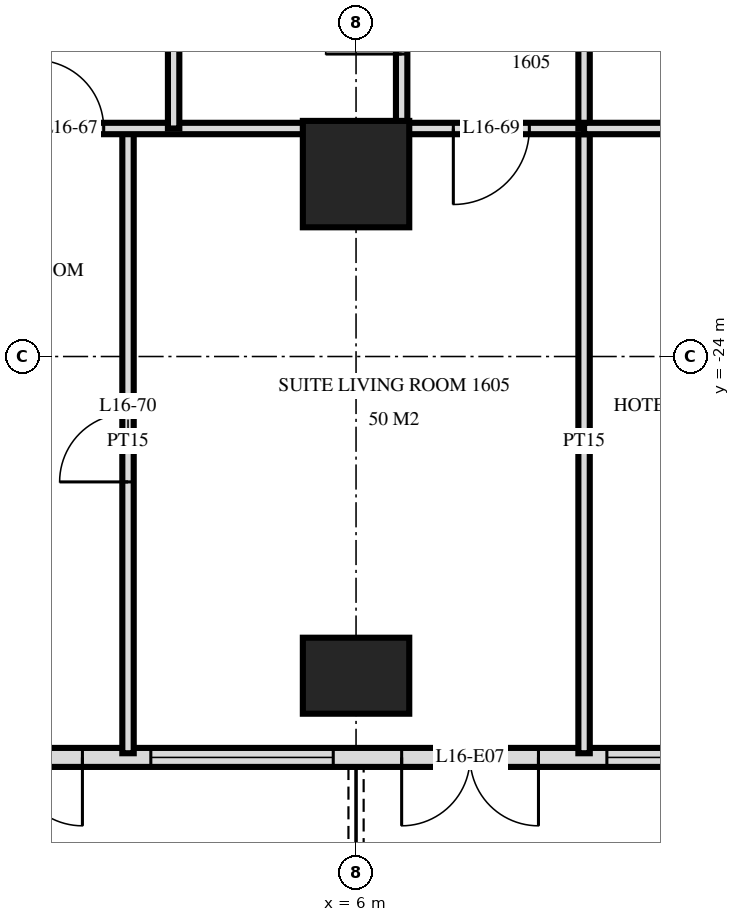
"""IFC4 building model, lengths in metres.
Left out: names, types, materials, properties, quantities, classifications, styles, units other than length and angle.
Written with IfcOpenShell. Run it as: python <this file> out.ifc"""

import sys

from ifc_helpers import new_model, si_unit, direction, frame, frame_2d, origin, origin_2d, place, context, subcontext, project, spatial, rectangle, extrude, element, fill, save


model = new_model("IFC4")
c1 = context("Model", 3, precision=1e-05, world=origin(), true_north=direction((0.0, 1.0)))
c2 = subcontext(c1, "Body", "Model", "MODEL_VIEW")
j1 = project(units=[si_unit("LENGTHUNIT", "METRE"), si_unit("PLANEANGLEUNIT", "RADIAN")], contexts=[c1])
p1 = place(None, origin())
s1 = spatial("IfcSite", under=j1, at=p1, CompositionType="ELEMENT")
p2 = place(p1, origin())
s2 = spatial("IfcBuilding", under=s1, at=p2, CompositionType="ELEMENT")
p3 = place(p2, frame((0.0, 0.0, 67.2)))
s3 = spatial("IfcBuildingStorey", under=s2, at=p3, CompositionType="ELEMENT", Elevation=67.2)
p4 = place(p3, frame((6.0, -28.2, 0.0), z_axis=(0.0, 0.0, 1.0), x_axis=(1.0, 0.0, 0.0)))
e1 = element("IfcColumn", 1, at=p4, inside=s3, PredefinedType="COLUMN", context=c2, shape_type="SweptSolid", body=[
    extrude(rectangle(XDim=1.4, YDim=1.0, at=origin_2d()), origin(), (0.0, 0.0, 1.0), 3.6),
])
p5 = place(p3, frame((6.0, -21.6, 0.0), z_axis=(0.0, 0.0, 1.0), x_axis=(1.0, 0.0, 0.0)))
e2 = element("IfcColumn", 2, at=p5, inside=s3, PredefinedType="COLUMN", context=c2, shape_type="SweptSolid", body=[
    extrude(rectangle(XDim=1.4, YDim=1.4, at=origin_2d()), origin(), (0.0, 0.0, 1.0), 3.6),
])
p6 = place(p3, frame((-28.775, -29.275, 0.0), z_axis=(0.0, 0.0, 1.0), x_axis=(1.0, 0.0, 0.0)))
e3 = element("IfcWall", 3, at=p6, inside=s3, PredefinedType="SOLIDWALL", context=c2, shape_type="SweptSolid", body=[
    extrude(rectangle(XDim=57.551, YDim=0.25, at=frame_2d((28.775, 0.0))), origin(), (0.0, 0.0, 1.0), 3.32),
])
p7 = place(p6, frame((0.575, 0.0, 0.0)))
e4 = element("IfcOpeningElement", 4, at=p7, cuts=e3, PredefinedType="OPENING", context=c2, shape_type="SweptSolid", body=[
    extrude(rectangle(XDim=1.8, YDim=2.4, at=frame_2d((0.9, 1.2))), frame((0.0, 0.135, 0.0), z_axis=(0.0, -1.0, 0.0), x_axis=(1.0, 0.0, 0.0)), (0.0, 0.0, 1.0), 0.27),
])
p8 = place(p6, frame((5.075, 0.0, 0.3)))
e5 = element("IfcOpeningElement", 5, at=p8, cuts=e3, PredefinedType="OPENING", context=c2, shape_type="SweptSolid", body=[
    extrude(rectangle(XDim=2.4, YDim=2.1, at=frame_2d((1.2, 1.05))), frame((0.0, 0.135, 0.0), z_axis=(0.0, -1.0, 0.0), x_axis=(1.0, 0.0, 0.0)), (0.0, 0.0, 1.0), 0.27),
])
p9 = place(p6, frame((8.375, 0.0, 0.0)))
e6 = element("IfcOpeningElement", 6, at=p9, cuts=e3, PredefinedType="OPENING", context=c2, shape_type="SweptSolid", body=[
    extrude(rectangle(XDim=1.8, YDim=2.4, at=frame_2d((0.9, 1.2))), frame((0.0, 0.135, 0.0), z_axis=(0.0, -1.0, 0.0), x_axis=(1.0, 0.0, 0.0)), (0.0, 0.0, 1.0), 0.27),
])
p10 = place(p6, frame((11.375, 0.0, 0.0)))
e7 = element("IfcOpeningElement", 7, at=p10, cuts=e3, PredefinedType="OPENING", context=c2, shape_type="SweptSolid", body=[
    extrude(rectangle(XDim=1.8, YDim=2.4, at=frame_2d((0.9, 1.2))), frame((0.0, 0.135, 0.0), z_axis=(0.0, -1.0, 0.0), x_axis=(1.0, 0.0, 0.0)), (0.0, 0.0, 1.0), 0.27),
])
p11 = place(p6, frame((14.075, 0.0, 0.3)))
e8 = element("IfcOpeningElement", 8, at=p11, cuts=e3, PredefinedType="OPENING", context=c2, shape_type="SweptSolid", body=[
    extrude(rectangle(XDim=2.4, YDim=2.1, at=frame_2d((1.2, 1.05))), frame((0.0, 0.135, 0.0), z_axis=(0.0, -1.0, 0.0), x_axis=(1.0, 0.0, 0.0)), (0.0, 0.0, 1.0), 0.27),
])
p12 = place(p6, frame((17.375, 0.0, 0.0)))
e9 = element("IfcOpeningElement", 9, at=p12, cuts=e3, PredefinedType="OPENING", context=c2, shape_type="SweptSolid", body=[
    extrude(rectangle(XDim=1.8, YDim=2.4, at=frame_2d((0.9, 1.2))), frame((0.0, 0.135, 0.0), z_axis=(0.0, -1.0, 0.0), x_axis=(1.0, 0.0, 0.0)), (0.0, 0.0, 1.0), 0.27),
])
p13 = place(p6, frame((20.075, 0.0, 0.3)))
e10 = element("IfcOpeningElement", 10, at=p13, cuts=e3, PredefinedType="OPENING", context=c2, shape_type="SweptSolid", body=[
    extrude(rectangle(XDim=2.4, YDim=2.1, at=frame_2d((1.2, 1.05))), frame((0.0, 0.135, 0.0), z_axis=(0.0, -1.0, 0.0), x_axis=(1.0, 0.0, 0.0)), (0.0, 0.0, 1.0), 0.27),
])
p14 = place(p6, frame((23.075, 0.0, 0.3)))
e11 = element("IfcOpeningElement", 11, at=p14, cuts=e3, PredefinedType="OPENING", context=c2, shape_type="SweptSolid", body=[
    extrude(rectangle(XDim=2.4, YDim=2.1, at=frame_2d((1.2, 1.05))), frame((0.0, 0.135, 0.0), z_axis=(0.0, -1.0, 0.0), x_axis=(1.0, 0.0, 0.0)), (0.0, 0.0, 1.0), 0.27),
])
p15 = place(p6, frame((26.375, 0.0, 0.0)))
e12 = element("IfcOpeningElement", 12, at=p15, cuts=e3, PredefinedType="OPENING", context=c2, shape_type="SweptSolid", body=[
    extrude(rectangle(XDim=1.8, YDim=2.4, at=frame_2d((0.9, 1.2))), frame((0.0, 0.135, 0.0), z_axis=(0.0, -1.0, 0.0), x_axis=(1.0, 0.0, 0.0)), (0.0, 0.0, 1.0), 0.27),
])
p16 = place(p6, frame((29.375, 0.0, 0.0)))
e13 = element("IfcOpeningElement", 13, at=p16, cuts=e3, PredefinedType="OPENING", context=c2, shape_type="SweptSolid", body=[
    extrude(rectangle(XDim=1.8, YDim=2.4, at=frame_2d((0.9, 1.2))), frame((0.0, 0.135, 0.0), z_axis=(0.0, -1.0, 0.0), x_axis=(1.0, 0.0, 0.0)), (0.0, 0.0, 1.0), 0.27),
])
p17 = place(p6, frame((32.075, 0.0, 0.3)))
e14 = element("IfcOpeningElement", 14, at=p17, cuts=e3, PredefinedType="OPENING", context=c2, shape_type="SweptSolid", body=[
    extrude(rectangle(XDim=2.4, YDim=2.1, at=frame_2d((1.2, 1.05))), frame((0.0, 0.135, 0.0), z_axis=(0.0, -1.0, 0.0), x_axis=(1.0, 0.0, 0.0)), (0.0, 0.0, 1.0), 0.27),
])
p18 = place(p6, frame((35.375, 0.0, 0.0)))
e15 = element("IfcOpeningElement", 15, at=p18, cuts=e3, PredefinedType="OPENING", context=c2, shape_type="SweptSolid", body=[
    extrude(rectangle(XDim=1.8, YDim=2.4, at=frame_2d((0.9, 1.2))), frame((0.0, 0.135, 0.0), z_axis=(0.0, -1.0, 0.0), x_axis=(1.0, 0.0, 0.0)), (0.0, 0.0, 1.0), 0.27),
])
p19 = place(p6, frame((38.075, 0.0, 0.3)))
e16 = element("IfcOpeningElement", 16, at=p19, cuts=e3, PredefinedType="OPENING", context=c2, shape_type="SweptSolid", body=[
    extrude(rectangle(XDim=2.4, YDim=2.1, at=frame_2d((1.2, 1.05))), frame((0.0, 0.135, 0.0), z_axis=(0.0, -1.0, 0.0), x_axis=(1.0, 0.0, 0.0)), (0.0, 0.0, 1.0), 0.27),
])
p20 = place(p6, frame((41.075, 0.0, 0.3)))
e17 = element("IfcOpeningElement", 17, at=p20, cuts=e3, PredefinedType="OPENING", context=c2, shape_type="SweptSolid", body=[
    extrude(rectangle(XDim=2.4, YDim=2.1, at=frame_2d((1.2, 1.05))), frame((0.0, 0.135, 0.0), z_axis=(0.0, -1.0, 0.0), x_axis=(1.0, 0.0, 0.0)), (0.0, 0.0, 1.0), 0.27),
])
p21 = place(p6, frame((44.375, 0.0, 0.0)))
e18 = element("IfcOpeningElement", 18, at=p21, cuts=e3, PredefinedType="OPENING", context=c2, shape_type="SweptSolid", body=[
    extrude(rectangle(XDim=1.8, YDim=2.4, at=frame_2d((0.9, 1.2))), frame((0.0, 0.135, 0.0), z_axis=(0.0, -1.0, 0.0), x_axis=(1.0, 0.0, 0.0)), (0.0, 0.0, 1.0), 0.27),
])
p22 = place(p6, frame((47.075, 0.0, 0.3)))
e19 = element("IfcOpeningElement", 19, at=p22, cuts=e3, PredefinedType="OPENING", context=c2, shape_type="SweptSolid", body=[
    extrude(rectangle(XDim=2.4, YDim=2.1, at=frame_2d((1.2, 1.05))), frame((0.0, 0.135, 0.0), z_axis=(0.0, -1.0, 0.0), x_axis=(1.0, 0.0, 0.0)), (0.0, 0.0, 1.0), 0.27),
])
p23 = place(p6, frame((50.375, 0.0, 0.0)))
e20 = element("IfcOpeningElement", 20, at=p23, cuts=e3, PredefinedType="OPENING", context=c2, shape_type="SweptSolid", body=[
    extrude(rectangle(XDim=1.8, YDim=2.4, at=frame_2d((0.9, 1.2))), frame((0.0, 0.135, 0.0), z_axis=(0.0, -1.0, 0.0), x_axis=(1.0, 0.0, 0.0)), (0.0, 0.0, 1.0), 0.27),
])
p24 = place(p6, frame((53.375, 0.0, 0.0)))
e21 = element("IfcOpeningElement", 21, at=p24, cuts=e3, PredefinedType="OPENING", context=c2, shape_type="SweptSolid", body=[
    extrude(rectangle(XDim=1.8, YDim=2.4, at=frame_2d((0.9, 1.2))), frame((0.0, 0.135, 0.0), z_axis=(0.0, -1.0, 0.0), x_axis=(1.0, 0.0, 0.0)), (0.0, 0.0, 1.0), 0.27),
])
p25 = place(p3, frame((9.0, -21.0, 0.0), z_axis=(0.0, 0.0, 1.0), x_axis=(0.0, 1.0, 0.0)))
e22 = element("IfcWall", 22, at=p25, inside=s3, PredefinedType="PARTITIONING", context=c2, shape_type="SweptSolid", body=[
    extrude(rectangle(XDim=3.0, YDim=0.15, at=frame_2d((1.5, 0.0))), origin(), (0.0, 0.0, 1.0), 3.32),
])
p26 = place(p3, frame((9.0, -29.22, 0.0), z_axis=(0.0, 0.0, 1.0), x_axis=(0.0, 1.0, 0.0)))
e23 = element("IfcWall", 23, at=p26, inside=s3, PredefinedType="PARTITIONING", context=c2, shape_type="SweptSolid", body=[
    extrude(rectangle(XDim=8.22, YDim=0.15, at=frame_2d((4.11, 0.0))), origin(), (0.0, 0.0, 1.0), 3.32),
])
p27 = place(p3, frame((6.6, -21.0, 0.0), z_axis=(0.0, 0.0, 1.0), x_axis=(0.0, 1.0, 0.0)))
e24 = element("IfcWall", 24, at=p27, inside=s3, PredefinedType="PARTITIONING", context=c2, shape_type="SweptSolid", body=[
    extrude(rectangle(XDim=3.0, YDim=0.15, at=frame_2d((1.5, 0.0))), origin(), (0.0, 0.0, 1.0), 3.32),
])
p28 = place(p27, frame((0.98, 0.0, 0.0)))
e25 = element("IfcOpeningElement", 25, at=p28, cuts=e24, PredefinedType="OPENING", context=c2, shape_type="SweptSolid", body=[
    extrude(rectangle(XDim=1.0, YDim=2.1, at=frame_2d((0.5, 1.05))), frame((0.0, 0.085, 0.0), z_axis=(0.0, -1.0, 0.0), x_axis=(1.0, 0.0, 0.0)), (0.0, 0.0, 1.0), 0.17),
])
p29 = place(p3, frame((3.6, -21.0, 0.0), z_axis=(0.0, 0.0, 1.0), x_axis=(0.0, 1.0, 0.0)))
e26 = element("IfcWall", 26, at=p29, inside=s3, PredefinedType="PARTITIONING", context=c2, shape_type="SweptSolid", body=[
    extrude(rectangle(XDim=3.0, YDim=0.15, at=frame_2d((1.5, 0.0))), origin(), (0.0, 0.0, 1.0), 3.32),
])
p30 = place(p3, frame((3.0, -29.22, 0.0), z_axis=(0.0, 0.0, 1.0), x_axis=(0.0, 1.0, 0.0)))
e27 = element("IfcWall", 27, at=p30, inside=s3, PredefinedType="PARTITIONING", context=c2, shape_type="SweptSolid", body=[
    extrude(rectangle(XDim=8.22, YDim=0.15, at=frame_2d((4.11, 0.0))), origin(), (0.0, 0.0, 1.0), 3.32),
])
p31 = place(p30, frame((3.57, 0.0, 0.0)))
e28 = element("IfcOpeningElement", 28, at=p31, cuts=e27, PredefinedType="OPENING", context=c2, shape_type="SweptSolid", body=[
    extrude(rectangle(XDim=0.9, YDim=2.1, at=frame_2d((0.45, 1.05))), frame((0.0, 0.085, 0.0), z_axis=(0.0, -1.0, 0.0), x_axis=(1.0, 0.0, 0.0)), (0.0, 0.0, 1.0), 0.17),
])
p32 = place(p3, frame((6.6, -21.0, 0.0), z_axis=(0.0, 0.0, 1.0), x_axis=(1.0, 0.0, 0.0)))
e29 = element("IfcWall", 29, at=p32, inside=s3, PredefinedType="PARTITIONING", context=c2, shape_type="SweptSolid", body=[
    extrude(rectangle(XDim=2.4, YDim=0.15, at=frame_2d((1.2, 0.0))), origin(), (0.0, 0.0, 1.0), 3.32),
])
p33 = place(p32, frame((0.68, 0.0, 0.0)))
e30 = element("IfcOpeningElement", 30, at=p33, cuts=e29, PredefinedType="OPENING", context=c2, shape_type="SweptSolid", body=[
    extrude(rectangle(XDim=1.0, YDim=2.1, at=frame_2d((0.5, 1.05))), frame((0.0, 0.085, 0.0), z_axis=(0.0, -1.0, 0.0), x_axis=(1.0, 0.0, 0.0)), (0.0, 0.0, 1.0), 0.17),
])
p34 = place(p3, frame((1.5, -21.0, 0.0), z_axis=(0.0, 0.0, 1.0), x_axis=(1.0, 0.0, 0.0)))
e31 = element("IfcWall", 31, at=p34, inside=s3, PredefinedType="PARTITIONING", context=c2, shape_type="SweptSolid", body=[
    extrude(rectangle(XDim=5.1, YDim=0.15, at=frame_2d((2.55, 0.0))), origin(), (0.0, 0.0, 1.0), 3.32),
])
p35 = place(p34, frame((0.28, 0.0, 0.0)))
e32 = element("IfcOpeningElement", 32, at=p35, cuts=e31, PredefinedType="OPENING", context=c2, shape_type="SweptSolid", body=[
    extrude(rectangle(XDim=0.9, YDim=2.1, at=frame_2d((0.45, 1.05))), frame((0.0, 0.085, 0.0), z_axis=(0.0, -1.0, 0.0), x_axis=(1.0, 0.0, 0.0)), (0.0, 0.0, 1.0), 0.17),
])
p36 = place(p3, frame((9.0, -21.0, 0.0), z_axis=(0.0, 0.0, 1.0), x_axis=(1.0, 0.0, 0.0)))
e33 = element("IfcWall", 33, at=p36, inside=s3, PredefinedType="PARTITIONING", context=c2, shape_type="SweptSolid", body=[
    extrude(rectangle(XDim=1.7, YDim=0.15, at=frame_2d((0.85, 0.0))), origin(), (0.0, 0.0, 1.0), 3.32),
])
p37 = place(p16, frame((0.9, 0.0, 0.0), z_axis=(0.0, 0.0, 1.0), x_axis=(-1.0, 0.0, 0.0)))
e34 = element("IfcDoor", 34, at=p37, inside=s3, OperationType="DOUBLE_DOOR_SINGLE_SWING", PredefinedType="DOOR", context=c2, shape_type="SweptSolid", body=[
    extrude(rectangle(XDim=1.8, YDim=2.4, at=frame_2d((0.0, 1.2))), frame((0.0, -0.025, 0.0), z_axis=(0.0, 1.0, 0.0), x_axis=(-1.0, 0.0, 0.0)), (0.0, 0.0, 1.0), 0.05),
])
fill(e13, e34)
p38 = place(p17, origin())
e35 = element("IfcWindow", 35, at=p38, inside=s3, PartitioningType="SINGLE_PANEL", PredefinedType="WINDOW", context=c2, shape_type="SweptSolid", body=[
    extrude(rectangle(XDim=2.4, YDim=2.1, at=frame_2d((1.2, 1.05))), frame((0.0, 0.03, 0.0), z_axis=(0.0, -1.0, 0.0), x_axis=(1.0, 0.0, 0.0)), (0.0, 0.0, 1.0), 0.06),
])
fill(e14, e35)
p39 = place(p18, frame((0.9, 0.0, 0.0), z_axis=(0.0, 0.0, 1.0), x_axis=(-1.0, 0.0, 0.0)))
e36 = element("IfcDoor", 36, at=p39, inside=s3, OperationType="DOUBLE_DOOR_SINGLE_SWING", PredefinedType="DOOR", context=c2, shape_type="SweptSolid", body=[
    extrude(rectangle(XDim=1.8, YDim=2.4, at=frame_2d((0.0, 1.2))), frame((0.0, -0.025, 0.0), z_axis=(0.0, 1.0, 0.0), x_axis=(-1.0, 0.0, 0.0)), (0.0, 0.0, 1.0), 0.05),
])
fill(e15, e36)
p40 = place(p19, origin())
e37 = element("IfcWindow", 37, at=p40, inside=s3, PartitioningType="SINGLE_PANEL", PredefinedType="WINDOW", context=c2, shape_type="SweptSolid", body=[
    extrude(rectangle(XDim=2.4, YDim=2.1, at=frame_2d((1.2, 1.05))), frame((0.0, 0.03, 0.0), z_axis=(0.0, -1.0, 0.0), x_axis=(1.0, 0.0, 0.0)), (0.0, 0.0, 1.0), 0.06),
])
fill(e16, e37)
p41 = place(p35, origin())
e38 = element("IfcDoor", 38, at=p41, inside=s3, OperationType="SINGLE_SWING_RIGHT", PredefinedType="DOOR", context=c2, shape_type="SweptSolid", body=[
    extrude(rectangle(XDim=0.9, YDim=2.1, at=frame_2d((0.45, 1.05))), frame((0.0, 0.025, 0.0), z_axis=(0.0, -1.0, 0.0), x_axis=(1.0, 0.0, 0.0)), (0.0, 0.0, 1.0), 0.05),
])
fill(e32, e38)
p42 = place(p28, origin())
e39 = element("IfcDoor", 39, at=p42, inside=s3, OperationType="SINGLE_SWING_RIGHT", PredefinedType="DOOR", context=c2, shape_type="SweptSolid", body=[
    extrude(rectangle(XDim=1.0, YDim=2.1, at=frame_2d((0.5, 1.05))), frame((0.0, 0.025, 0.0), z_axis=(0.0, -1.0, 0.0), x_axis=(1.0, 0.0, 0.0)), (0.0, 0.0, 1.0), 0.05),
])
fill(e25, e39)
p43 = place(p33, frame((0.5, 0.0, 0.0), z_axis=(0.0, 0.0, 1.0), x_axis=(-1.0, 0.0, 0.0)))
e40 = element("IfcDoor", 40, at=p43, inside=s3, OperationType="SINGLE_SWING_LEFT", PredefinedType="DOOR", context=c2, shape_type="SweptSolid", body=[
    extrude(rectangle(XDim=1.0, YDim=2.1, at=frame_2d((0.0, 1.05))), frame((0.0, -0.025, 0.0), z_axis=(0.0, 1.0, 0.0), x_axis=(-1.0, 0.0, 0.0)), (0.0, 0.0, 1.0), 0.05),
])
fill(e30, e40)
p44 = place(p31, origin())
e41 = element("IfcDoor", 41, at=p44, inside=s3, OperationType="SINGLE_SWING_RIGHT", PredefinedType="DOOR", context=c2, shape_type="SweptSolid", body=[
    extrude(rectangle(XDim=0.9, YDim=2.1, at=frame_2d((0.45, 1.05))), frame((0.0, 0.025, 0.0), z_axis=(0.0, -1.0, 0.0), x_axis=(1.0, 0.0, 0.0)), (0.0, 0.0, 1.0), 0.05),
])
fill(e28, e41)
save(model, sys.argv[1])
